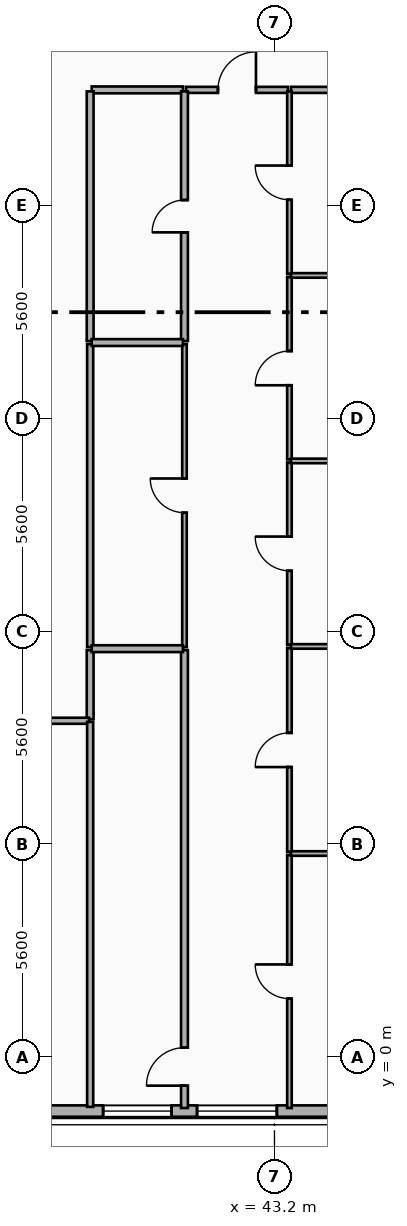
"""IFC4 building model, lengths in metres.
Left out: names, types, materials, properties, quantities, classifications, styles, units other than length and angle.
Written with IfcOpenShell. Run it as: python <this file> out.ifc"""

import sys

from ifc_helpers import new_model, si_unit, direction, frame, frame_2d, origin, place, context, subcontext, project, spatial, rectangle, extrude, element, fill, save


model = new_model("IFC4")
c1 = context("Model", 3, precision=1e-05, world=origin(), true_north=direction((0.0, 1.0)))
c2 = subcontext(c1, "Body", "Model", "MODEL_VIEW")
j1 = project(units=[si_unit("LENGTHUNIT", "METRE"), si_unit("PLANEANGLEUNIT", "RADIAN")], contexts=[c1])
p1 = place(None, origin())
s1 = spatial("IfcSite", under=j1, at=p1, CompositionType="ELEMENT")
p2 = place(p1, origin())
s2 = spatial("IfcBuilding", under=s1, at=p2, CompositionType="ELEMENT")
p3 = place(p2, frame((0.0, 0.0, 243.6)))
s3 = spatial("IfcBuildingStorey", under=s2, at=p3, CompositionType="ELEMENT", Elevation=243.6)
p4 = place(p3, frame((45.2, -1.42, 0.0), z_axis=(0.0, 0.0, 1.0), x_axis=(-1.0, 0.0, 0.0)))
e1 = element("IfcWall", 1, at=p4, inside=s3, PredefinedType="SOLIDWALL", context=c2, shape_type="SweptSolid", body=[
    extrude(rectangle(XDim=32.8, YDim=0.3, at=frame_2d((16.4, 0.0))), origin(), (0.0, 0.0, 1.0), 3.42),
])
p5 = place(p4, frame((29.071, 0.0, 0.75)))
e2 = element("IfcOpeningElement", 2, at=p5, cuts=e1, PredefinedType="OPENING", context=c2, shape_type="SweptSolid", body=[
    extrude(rectangle(XDim=2.1, YDim=2.1, at=frame_2d((1.05, 1.05))), frame((0.0, 0.16, 0.0), z_axis=(0.0, -1.0, 0.0), x_axis=(1.0, 0.0, 0.0)), (0.0, 0.0, 1.0), 0.32),
])
p6 = place(p4, frame((26.745, 0.0, 0.75)))
e3 = element("IfcOpeningElement", 3, at=p6, cuts=e1, PredefinedType="OPENING", context=c2, shape_type="SweptSolid", body=[
    extrude(rectangle(XDim=1.6, YDim=1.95, at=frame_2d((0.8, 0.975))), frame((0.0, 0.16, 0.0), z_axis=(0.0, -1.0, 0.0), x_axis=(1.0, 0.0, 0.0)), (0.0, 0.0, 1.0), 0.32),
])
p7 = place(p4, frame((18.105, 0.0, 0.75)))
e4 = element("IfcOpeningElement", 4, at=p7, cuts=e1, PredefinedType="OPENING", context=c2, shape_type="SweptSolid", body=[
    extrude(rectangle(XDim=2.1, YDim=2.1, at=frame_2d((1.05, 1.05))), frame((0.0, 0.16, 0.0), z_axis=(0.0, -1.0, 0.0), x_axis=(1.0, 0.0, 0.0)), (0.0, 0.0, 1.0), 0.32),
])
p8 = place(p4, frame((21.762, 0.0, 0.75)))
e5 = element("IfcOpeningElement", 5, at=p8, cuts=e1, PredefinedType="OPENING", context=c2, shape_type="SweptSolid", body=[
    extrude(rectangle(XDim=2.1, YDim=2.1, at=frame_2d((1.05, 1.05))), frame((0.0, 0.16, 0.0), z_axis=(0.0, -1.0, 0.0), x_axis=(1.0, 0.0, 0.0)), (0.0, 0.0, 1.0), 0.32),
])
p9 = place(p4, frame((11.364, 0.0, 0.75)))
e6 = element("IfcOpeningElement", 6, at=p9, cuts=e1, PredefinedType="OPENING", context=c2, shape_type="SweptSolid", body=[
    extrude(rectangle(XDim=2.1, YDim=2.1, at=frame_2d((1.05, 1.05))), frame((0.0, 0.16, 0.0), z_axis=(0.0, -1.0, 0.0), x_axis=(1.0, 0.0, 0.0)), (0.0, 0.0, 1.0), 0.32),
])
p10 = place(p4, frame((9.238, 0.0, 0.68)))
e7 = element("IfcOpeningElement", 7, at=p10, cuts=e1, PredefinedType="OPENING", context=c2, shape_type="SweptSolid", body=[
    extrude(rectangle(XDim=1.2, YDim=1.5, at=frame_2d((0.6, 0.75))), frame((0.0, 0.16, 0.0), z_axis=(0.0, -1.0, 0.0), x_axis=(1.0, 0.0, 0.0)), (0.0, 0.0, 1.0), 0.32),
])
p11 = place(p4, frame((14.669, 0.0, 0.75)))
e8 = element("IfcOpeningElement", 8, at=p11, cuts=e1, PredefinedType="OPENING", context=c2, shape_type="SweptSolid", body=[
    extrude(rectangle(XDim=2.1, YDim=2.1, at=frame_2d((1.05, 1.05))), frame((0.0, 0.16, 0.0), z_axis=(0.0, -1.0, 0.0), x_axis=(1.0, 0.0, 0.0)), (0.0, 0.0, 1.0), 0.32),
])
p12 = place(p4, frame((1.937, 0.0, 0.75)))
e9 = element("IfcOpeningElement", 9, at=p12, cuts=e1, PredefinedType="OPENING", context=c2, shape_type="SweptSolid", body=[
    extrude(rectangle(XDim=2.1, YDim=2.1, at=frame_2d((1.05, 1.05))), frame((0.0, 0.16, 0.0), z_axis=(0.0, -1.0, 0.0), x_axis=(1.0, 0.0, 0.0)), (0.0, 0.0, 1.0), 0.32),
])
p13 = place(p4, frame((4.709, 0.0, 0.8)))
e10 = element("IfcOpeningElement", 10, at=p13, cuts=e1, PredefinedType="OPENING", context=c2, shape_type="SweptSolid", body=[
    extrude(rectangle(XDim=1.8, YDim=1.8, at=frame_2d((0.9, 0.9))), frame((0.0, 0.16, 0.0), z_axis=(0.0, -1.0, 0.0), x_axis=(1.0, 0.0, 0.0)), (0.0, 0.0, 1.0), 0.32),
])
p14 = place(p3, frame((40.872, 25.45, 0.0), z_axis=(0.0, 0.0, 1.0), x_axis=(1.0, 0.0, 0.0)))
e11 = element("IfcWall", 11, at=p14, inside=s3, PredefinedType="PARTITIONING", context=c2, shape_type="SweptSolid", body=[
    extrude(rectangle(XDim=2.682, YDim=0.16, at=frame_2d((1.341, 0.0))), origin(), (0.0, 0.0, 1.0), 3.42),
])
p15 = place(p14, frame((0.841, 0.0, 0.0)))
e12 = element("IfcOpeningElement", 12, at=p15, cuts=e11, PredefinedType="OPENING", context=c2, shape_type="SweptSolid", body=[
    extrude(rectangle(XDim=1.0, YDim=2.15, at=frame_2d((0.5, 1.075))), frame((0.0, 0.09, 0.0), z_axis=(0.0, -1.0, 0.0), x_axis=(1.0, 0.0, 0.0)), (0.0, 0.0, 1.0), 0.18),
])
p16 = place(p3, frame((38.39, 25.45, 0.0), z_axis=(0.0, 0.0, 1.0), x_axis=(1.0, 0.0, 0.0)))
e13 = element("IfcWall", 13, at=p16, inside=s3, PredefinedType="PLUMBINGWALL", context=c2, shape_type="SweptSolid", body=[
    extrude(rectangle(XDim=2.402, YDim=0.18, at=frame_2d((1.201, 0.0))), origin(), (0.0, 0.0, 1.0), 3.42),
])
p17 = place(p3, frame((43.634, 25.45, 0.0), z_axis=(0.0, 0.0, 1.0), x_axis=(1.0, 0.0, 0.0)))
e14 = element("IfcWall", 14, at=p17, inside=s3, PredefinedType="PARTITIONING", context=c2, shape_type="SweptSolid", body=[
    extrude(rectangle(XDim=5.506, YDim=0.16, at=frame_2d((2.753, 0.0))), origin(), (0.0, 0.0, 1.0), 2.7),
])
p18 = place(p3, frame((38.35, 8.89, 0.0), z_axis=(0.0, 0.0, 1.0), x_axis=(0.0, 1.0, 0.0)))
e15 = element("IfcWall", 15, at=p18, inside=s3, PredefinedType="PLUMBINGWALL", context=c2, shape_type="SweptSolid", body=[
    extrude(rectangle(XDim=1.817, YDim=0.18, at=frame_2d((0.909, 0.0))), origin(), (0.0, 0.0, 1.0), 3.42),
])
p19 = place(p3, frame((38.35, 10.787, 0.0), z_axis=(0.0, 0.0, 1.0), x_axis=(0.0, 1.0, 0.0)))
e16 = element("IfcWall", 16, at=p19, inside=s3, PredefinedType="PARTITIONING", context=c2, shape_type="SweptSolid", body=[
    extrude(rectangle(XDim=7.975, YDim=0.16, at=frame_2d((3.987, 0.0))), origin(), (0.0, 0.0, 1.0), 2.9),
])
p20 = place(p3, frame((38.35, 18.842, 0.0), z_axis=(0.0, 0.0, 1.0), x_axis=(0.0, 1.0, 0.0)))
e17 = element("IfcWall", 17, at=p20, inside=s3, PredefinedType="PLUMBINGWALL", context=c2, shape_type="SweptSolid", body=[
    extrude(rectangle(XDim=6.568, YDim=0.18, at=frame_2d((3.284, 0.0))), origin(), (0.0, 0.0, 1.0), 2.9),
])
p21 = place(p3, frame((40.832, -1.34, 0.0), z_axis=(0.0, 0.0, 1.0), x_axis=(0.0, 1.0, 0.0)))
e18 = element("IfcWall", 18, at=p21, inside=s3, PredefinedType="PLUMBINGWALL", context=c2, shape_type="SweptSolid", body=[
    extrude(rectangle(XDim=12.047, YDim=0.18, at=frame_2d((6.023, 0.0))), origin(), (0.0, 0.0, 1.0), 3.05),
])
p22 = place(p21, frame((0.589, 0.0, 0.0)))
e19 = element("IfcOpeningElement", 19, at=p22, cuts=e18, PredefinedType="OPENING", context=c2, shape_type="SweptSolid", body=[
    extrude(rectangle(XDim=1.0, YDim=2.15, at=frame_2d((0.5, 1.075))), frame((0.0, 0.1, 0.0), z_axis=(0.0, -1.0, 0.0), x_axis=(1.0, 0.0, 0.0)), (0.0, 0.0, 1.0), 0.2),
])
p23 = place(p3, frame((40.832, 10.787, 0.0), z_axis=(0.0, 0.0, 1.0), x_axis=(0.0, 1.0, 0.0)))
e20 = element("IfcWall", 20, at=p23, inside=s3, PredefinedType="PARTITIONING", context=c2, shape_type="SweptSolid", body=[
    extrude(rectangle(XDim=7.975, YDim=0.12, at=frame_2d((3.987, 0.0))), origin(), (0.0, 0.0, 1.0), 2.9),
])
p24 = place(p23, frame((3.538, 0.0, 0.0)))
e21 = element("IfcOpeningElement", 21, at=p24, cuts=e20, PredefinedType="OPENING", context=c2, shape_type="SweptSolid", body=[
    extrude(rectangle(XDim=0.9, YDim=2.1, at=frame_2d((0.45, 1.05))), frame((0.0, 0.07, 0.0), z_axis=(0.0, -1.0, 0.0), x_axis=(1.0, 0.0, 0.0)), (0.0, 0.0, 1.0), 0.14),
])
p25 = place(p3, frame((40.832, 18.842, 0.0), z_axis=(0.0, 0.0, 1.0), x_axis=(0.0, 1.0, 0.0)))
e22 = element("IfcWall", 22, at=p25, inside=s3, PredefinedType="PLUMBINGWALL", context=c2, shape_type="SweptSolid", body=[
    extrude(rectangle(XDim=6.568, YDim=0.18, at=frame_2d((3.284, 0.0))), origin(), (0.0, 0.0, 1.0), 2.9),
])
p26 = place(p25, frame((2.859, 0.0, 0.0)))
e23 = element("IfcOpeningElement", 23, at=p26, cuts=e22, PredefinedType="OPENING", context=c2, shape_type="SweptSolid", body=[
    extrude(rectangle(XDim=0.85, YDim=2.1, at=frame_2d((0.425, 1.05))), frame((0.0, 0.1, 0.0), z_axis=(0.0, -1.0, 0.0), x_axis=(1.0, 0.0, 0.0)), (0.0, 0.0, 1.0), 0.2),
])
p27 = place(p3, frame((43.594, -1.34, 0.0), z_axis=(0.0, 0.0, 1.0), x_axis=(0.0, 1.0, 0.0)))
e24 = element("IfcWall", 24, at=p27, inside=s3, PredefinedType="PARTITIONING", context=c2, shape_type="SweptSolid", body=[
    extrude(rectangle(XDim=6.657, YDim=0.12, at=frame_2d((3.329, 0.0))), origin(), (0.0, 0.0, 1.0), 3.08),
])
p28 = place(p27, frame((2.878, 0.0, 0.0)))
e25 = element("IfcOpeningElement", 25, at=p28, cuts=e24, PredefinedType="OPENING", context=c2, shape_type="SweptSolid", body=[
    extrude(rectangle(XDim=0.9, YDim=2.1, at=frame_2d((0.45, 1.05))), frame((0.0, 0.07, 0.0), z_axis=(0.0, -1.0, 0.0), x_axis=(1.0, 0.0, 0.0)), (0.0, 0.0, 1.0), 0.14),
])
p29 = place(p3, frame((43.594, 5.397, 0.0), z_axis=(0.0, 0.0, 1.0), x_axis=(0.0, 1.0, 0.0)))
e26 = element("IfcWall", 26, at=p29, inside=s3, PredefinedType="PARTITIONING", context=c2, shape_type="SweptSolid", body=[
    extrude(rectangle(XDim=5.369, YDim=0.12, at=frame_2d((2.685, 0.0))), origin(), (0.0, 0.0, 1.0), 3.05),
])
p30 = place(p29, frame((2.235, 0.0, 0.0)))
e27 = element("IfcOpeningElement", 27, at=p30, cuts=e26, PredefinedType="OPENING", context=c2, shape_type="SweptSolid", body=[
    extrude(rectangle(XDim=0.9, YDim=2.1, at=frame_2d((0.45, 1.05))), frame((0.0, 0.07, 0.0), z_axis=(0.0, -1.0, 0.0), x_axis=(1.0, 0.0, 0.0)), (0.0, 0.0, 1.0), 0.14),
])
p31 = place(p3, frame((43.594, 10.846, 0.0), z_axis=(0.0, 0.0, 1.0), x_axis=(0.0, 1.0, 0.0)))
e28 = element("IfcWall", 28, at=p31, inside=s3, PredefinedType="PARTITIONING", context=c2, shape_type="SweptSolid", body=[
    extrude(rectangle(XDim=4.801, YDim=0.12, at=frame_2d((2.4, 0.0))), origin(), (0.0, 0.0, 1.0), 2.9),
])
p32 = place(p31, frame((1.95, 0.0, 0.0)))
e29 = element("IfcOpeningElement", 29, at=p32, cuts=e28, PredefinedType="OPENING", context=c2, shape_type="SweptSolid", body=[
    extrude(rectangle(XDim=0.9, YDim=2.1, at=frame_2d((0.45, 1.05))), frame((0.0, 0.07, 0.0), z_axis=(0.0, -1.0, 0.0), x_axis=(1.0, 0.0, 0.0)), (0.0, 0.0, 1.0), 0.14),
])
p33 = place(p3, frame((43.594, 15.727, 0.0), z_axis=(0.0, 0.0, 1.0), x_axis=(0.0, 1.0, 0.0)))
e30 = element("IfcWall", 30, at=p33, inside=s3, PredefinedType="PARTITIONING", context=c2, shape_type="SweptSolid", body=[
    extrude(rectangle(XDim=4.801, YDim=0.12, at=frame_2d((2.4, 0.0))), origin(), (0.0, 0.0, 1.0), 2.9),
])
p34 = place(p33, frame((1.95, 0.0, 0.0)))
e31 = element("IfcOpeningElement", 31, at=p34, cuts=e30, PredefinedType="OPENING", context=c2, shape_type="SweptSolid", body=[
    extrude(rectangle(XDim=0.9, YDim=2.1, at=frame_2d((0.45, 1.05))), frame((0.0, 0.07, 0.0), z_axis=(0.0, -1.0, 0.0), x_axis=(1.0, 0.0, 0.0)), (0.0, 0.0, 1.0), 0.14),
])
p35 = place(p3, frame((43.594, 20.608, 0.0), z_axis=(0.0, 0.0, 1.0), x_axis=(0.0, 1.0, 0.0)))
e32 = element("IfcWall", 32, at=p35, inside=s3, PredefinedType="PARTITIONING", context=c2, shape_type="SweptSolid", body=[
    extrude(rectangle(XDim=4.802, YDim=0.12, at=frame_2d((2.401, 0.0))), origin(), (0.0, 0.0, 1.0), 3.05),
])
p36 = place(p35, frame((1.951, 0.0, 0.0)))
e33 = element("IfcOpeningElement", 33, at=p36, cuts=e32, PredefinedType="OPENING", context=c2, shape_type="SweptSolid", body=[
    extrude(rectangle(XDim=0.9, YDim=2.1, at=frame_2d((0.45, 1.05))), frame((0.0, 0.07, 0.0), z_axis=(0.0, -1.0, 0.0), x_axis=(1.0, 0.0, 0.0)), (0.0, 0.0, 1.0), 0.14),
])
for number, where, z_axis, x_axis in (
    (34, (38.39, 10.747, 0.0), (0.0, 0.0, 1.0), (1.0, 0.0, 0.0)),
    (35, (38.39, 18.802, 0.0), (0.0, 0.0, 1.0), (1.0, 0.0, 0.0)),
):
    element("IfcWall", number, at=place(p3, frame(where, z_axis=z_axis, x_axis=x_axis)), inside=s3, PredefinedType="PLUMBINGWALL", context=c2, shape_type="SweptSolid", body=[
        extrude(rectangle(XDim=2.402, YDim=0.18, at=frame_2d((1.201, 0.0))), origin(), (0.0, 0.0, 1.0), 3.42),
    ])
for number, where, z_axis, x_axis in (
    (36, (43.634, 5.357, 0.0), (0.0, 0.0, 1.0), (1.0, 0.0, 0.0)),
    (37, (43.634, 10.806, 0.0), (0.0, 0.0, 1.0), (1.0, 0.0, 0.0)),
    (38, (43.634, 15.687, 0.0), (0.0, 0.0, 1.0), (1.0, 0.0, 0.0)),
    (39, (43.634, 20.568, 0.0), (0.0, 0.0, 1.0), (1.0, 0.0, 0.0)),
):
    element("IfcWall", number, at=place(p3, frame(where, z_axis=z_axis, x_axis=x_axis)), inside=s3, PredefinedType="PARTITIONING", context=c2, shape_type="SweptSolid", body=[
        extrude(rectangle(XDim=5.506, YDim=0.12, at=frame_2d((2.753, 0.0))), origin(), (0.0, 0.0, 1.0), 2.7),
    ])
p37 = place(p3, frame((36.38, 8.85, 0.0), z_axis=(0.0, 0.0, 1.0), x_axis=(1.0, 0.0, 0.0)))
e40 = element("IfcWall", 40, at=p37, inside=s3, PredefinedType="PARTITIONING", context=c2, shape_type="SweptSolid", body=[
    extrude(rectangle(XDim=1.94, YDim=0.16, at=frame_2d((0.97, 0.0))), origin(), (0.0, 0.0, 1.0), 2.7),
])
p38 = place(p3, frame((38.35, -1.31, 0.0), z_axis=(0.0, 0.0, 1.0), x_axis=(0.0, 1.0, 0.0)))
e41 = element("IfcWall", 41, at=p38, inside=s3, PredefinedType="PARTITIONING", context=c2, shape_type="SweptSolid", body=[
    extrude(rectangle(XDim=10.13, YDim=0.16, at=frame_2d((5.065, 0.0))), origin(), (0.0, 0.0, 1.0), 3.05),
])
p39 = place(p12, origin())
e42 = element("IfcWindow", 42, at=p39, inside=s3, PartitioningType="SINGLE_PANEL", PredefinedType="WINDOW", context=c2, shape_type="SweptSolid", body=[
    extrude(rectangle(XDim=2.1, YDim=2.1, at=frame_2d((1.05, 1.05))), frame((0.0, 0.03, 0.0), z_axis=(0.0, -1.0, 0.0), x_axis=(1.0, 0.0, 0.0)), (0.0, 0.0, 1.0), 0.06),
])
fill(e9, e42)
p40 = place(p13, origin())
e43 = element("IfcWindow", 43, at=p40, inside=s3, PartitioningType="SINGLE_PANEL", PredefinedType="WINDOW", context=c2, shape_type="SweptSolid", body=[
    extrude(rectangle(XDim=1.8, YDim=1.8, at=frame_2d((0.9, 0.9))), frame((0.0, 0.03, 0.0), z_axis=(0.0, -1.0, 0.0), x_axis=(1.0, 0.0, 0.0)), (0.0, 0.0, 1.0), 0.06),
])
fill(e10, e43)
p41 = place(p15, origin())
e44 = element("IfcDoor", 44, at=p41, inside=s3, OperationType="SINGLE_SWING_RIGHT", PredefinedType="DOOR", context=c2, shape_type="SweptSolid", body=[
    extrude(rectangle(XDim=1.0, YDim=2.15, at=frame_2d((0.5, 1.075))), frame((0.0, 0.025, 0.0), z_axis=(0.0, -1.0, 0.0), x_axis=(1.0, 0.0, 0.0)), (0.0, 0.0, 1.0), 0.05),
])
fill(e12, e44)
p42 = place(p22, origin())
e45 = element("IfcDoor", 45, at=p42, inside=s3, OperationType="SINGLE_SWING_LEFT", PredefinedType="DOOR", context=c2, shape_type="SweptSolid", body=[
    extrude(rectangle(XDim=1.0, YDim=2.15, at=frame_2d((0.5, 1.075))), frame((0.0, 0.025, 0.0), z_axis=(0.0, -1.0, 0.0), x_axis=(1.0, 0.0, 0.0)), (0.0, 0.0, 1.0), 0.05),
])
fill(e19, e45)
p43 = place(p24, origin())
e46 = element("IfcDoor", 46, at=p43, inside=s3, OperationType="SINGLE_SWING_RIGHT", PredefinedType="DOOR", context=c2, shape_type="SweptSolid", body=[
    extrude(rectangle(XDim=0.9, YDim=2.1, at=frame_2d((0.45, 1.05))), frame((0.0, 0.025, 0.0), z_axis=(0.0, -1.0, 0.0), x_axis=(1.0, 0.0, 0.0)), (0.0, 0.0, 1.0), 0.05),
])
fill(e21, e46)
p44 = place(p26, origin())
e47 = element("IfcDoor", 47, at=p44, inside=s3, OperationType="SINGLE_SWING_LEFT", PredefinedType="DOOR", context=c2, shape_type="SweptSolid", body=[
    extrude(rectangle(XDim=0.85, YDim=2.1, at=frame_2d((0.425, 1.05))), frame((0.0, 0.025, 0.0), z_axis=(0.0, -1.0, 0.0), x_axis=(1.0, 0.0, 0.0)), (0.0, 0.0, 1.0), 0.05),
])
fill(e23, e47)
p45 = place(p28, origin())
e48 = element("IfcDoor", 48, at=p45, inside=s3, OperationType="SINGLE_SWING_RIGHT", PredefinedType="DOOR", context=c2, shape_type="SweptSolid", body=[
    extrude(rectangle(XDim=0.9, YDim=2.1, at=frame_2d((0.45, 1.05))), frame((0.0, 0.025, 0.0), z_axis=(0.0, -1.0, 0.0), x_axis=(1.0, 0.0, 0.0)), (0.0, 0.0, 1.0), 0.05),
])
fill(e25, e48)
p46 = place(p30, origin())
e49 = element("IfcDoor", 49, at=p46, inside=s3, OperationType="SINGLE_SWING_LEFT", PredefinedType="DOOR", context=c2, shape_type="SweptSolid", body=[
    extrude(rectangle(XDim=0.9, YDim=2.1, at=frame_2d((0.45, 1.05))), frame((0.0, 0.025, 0.0), z_axis=(0.0, -1.0, 0.0), x_axis=(1.0, 0.0, 0.0)), (0.0, 0.0, 1.0), 0.05),
])
fill(e27, e49)
p47 = place(p32, origin())
e50 = element("IfcDoor", 50, at=p47, inside=s3, OperationType="SINGLE_SWING_RIGHT", PredefinedType="DOOR", context=c2, shape_type="SweptSolid", body=[
    extrude(rectangle(XDim=0.9, YDim=2.1, at=frame_2d((0.45, 1.05))), frame((0.0, 0.025, 0.0), z_axis=(0.0, -1.0, 0.0), x_axis=(1.0, 0.0, 0.0)), (0.0, 0.0, 1.0), 0.05),
])
fill(e29, e50)
p48 = place(p34, origin())
e51 = element("IfcDoor", 51, at=p48, inside=s3, OperationType="SINGLE_SWING_LEFT", PredefinedType="DOOR", context=c2, shape_type="SweptSolid", body=[
    extrude(rectangle(XDim=0.9, YDim=2.1, at=frame_2d((0.45, 1.05))), frame((0.0, 0.025, 0.0), z_axis=(0.0, -1.0, 0.0), x_axis=(1.0, 0.0, 0.0)), (0.0, 0.0, 1.0), 0.05),
])
fill(e31, e51)
p49 = place(p36, origin())
e52 = element("IfcDoor", 52, at=p49, inside=s3, OperationType="SINGLE_SWING_RIGHT", PredefinedType="DOOR", context=c2, shape_type="SweptSolid", body=[
    extrude(rectangle(XDim=0.9, YDim=2.1, at=frame_2d((0.45, 1.05))), frame((0.0, 0.025, 0.0), z_axis=(0.0, -1.0, 0.0), x_axis=(1.0, 0.0, 0.0)), (0.0, 0.0, 1.0), 0.05),
])
fill(e33, e52)
save(model, sys.argv[1])
